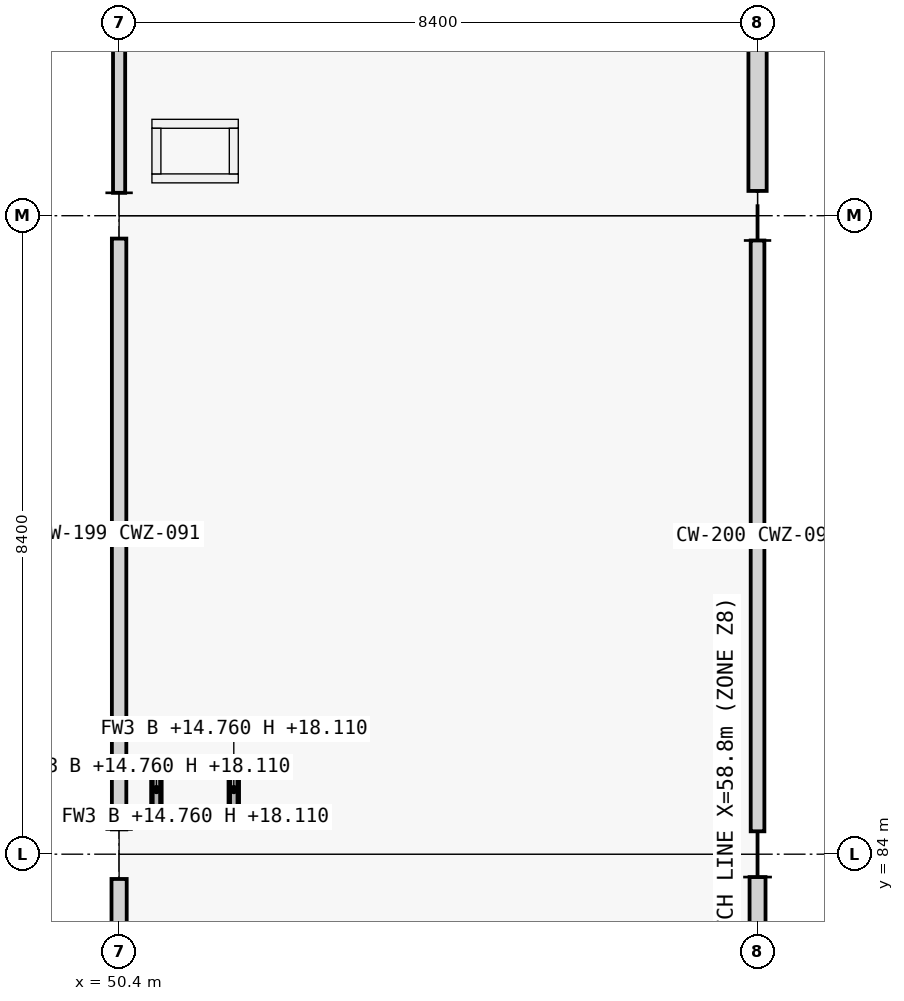
"""IFC4 building model, lengths in metres.
Left out: names, types, materials, properties, quantities, classifications, styles, units other than length and angle.
Written with IfcOpenShell. Run it as: python <this file> out.ifc"""

import sys

from ifc_helpers import new_model, si_unit, direction, frame, frame_2d, origin, origin_2d, place, context, subcontext, project, spatial, rectangle, extrude, element, save


model = new_model("IFC4")
c1 = context("Model", 3, precision=1e-05, world=origin(), true_north=direction((0.0, 1.0)))
c2 = subcontext(c1, "Body", "Model", "MODEL_VIEW")
j1 = project(units=[si_unit("LENGTHUNIT", "METRE"), si_unit("PLANEANGLEUNIT", "RADIAN")], contexts=[c1])
p1 = place(None, origin())
s1 = spatial("IfcSite", under=j1, at=p1, CompositionType="ELEMENT")
p2 = place(p1, origin())
s2 = spatial("IfcBuilding", under=s1, at=p2, CompositionType="ELEMENT")
p3 = place(p2, frame((0.0, 0.0, 14.76)))
s3 = spatial("IfcBuildingStorey", under=s2, at=p3, CompositionType="ELEMENT", Elevation=14.76)
p4 = place(p3, frame((50.4, 84.0, 0.0), z_axis=(0.0, 0.0, 1.0), x_axis=(1.0, 0.0, 0.0)))
e1 = element("IfcColumn", 1, at=p4, inside=s3, PredefinedType="COLUMN", context=c2, shape_type="SweptSolid", body=[
    extrude(rectangle(XDim=0.65, YDim=0.65, at=origin_2d()), origin(), (0.0, 0.0, 1.0), 4.32),
])
for number, where, z_axis, x_axis in (
    (2, (50.4, 92.4, 0.0), (0.0, 0.0, 1.0), (1.0, 0.0, 0.0)),
    (3, (58.8, 84.0, 0.0), (0.0, 0.0, 1.0), (1.0, 0.0, 0.0)),
):
    element("IfcColumn", number, at=place(p3, frame(where, z_axis=z_axis, x_axis=x_axis)), inside=s3, PredefinedType="COLUMN", context=c2, shape_type="SweptSolid", body=[
        extrude(rectangle(XDim=0.6, YDim=0.6, at=origin_2d()), origin(), (0.0, 0.0, 1.0), 4.32),
    ])
p5 = place(p3, frame((58.8, 92.4, 0.0), z_axis=(0.0, 0.0, 1.0), x_axis=(1.0, 0.0, 0.0)))
e4 = element("IfcColumn", 4, at=p5, inside=s3, PredefinedType="COLUMN", context=c2, shape_type="SweptSolid", body=[
    extrude(rectangle(XDim=0.65, YDim=0.65, at=origin_2d()), origin(), (0.0, 0.0, 1.0), 4.32),
])
for number, where, z_axis, x_axis in (
    (5, (50.832, 84.491, 0.0), (0.0, 0.0, 1.0), (1.0, 0.0, 0.0)),
    (6, (50.832, 85.209, 0.0), (0.0, 0.0, 1.0), (1.0, 0.0, 0.0)),
):
    element("IfcWall", number, at=place(p3, frame(where, z_axis=z_axis, x_axis=x_axis)), inside=s3, PredefinedType="PARTITIONING", context=c2, shape_type="SweptSolid", body=[
        extrude(rectangle(XDim=1.136, YDim=0.118, at=frame_2d((0.568, 0.0))), origin(), (0.0, 0.0, 1.0), 3.35),
    ])
for number, where, z_axis, x_axis in (
    (7, (50.891, 84.55, 0.0), (0.0, 0.0, 1.0), (0.0, 1.0, 0.0)),
    (8, (51.909, 84.55, 0.0), (0.0, 0.0, 1.0), (0.0, 1.0, 0.0)),
):
    element("IfcWall", number, at=place(p3, frame(where, z_axis=z_axis, x_axis=x_axis)), inside=s3, PredefinedType="PARTITIONING", context=c2, shape_type="SweptSolid", body=[
        extrude(rectangle(XDim=0.6, YDim=0.118, at=frame_2d((0.3, 0.0))), origin(), (0.0, 0.0, 1.0), 3.35),
    ])
for number, where, z_axis, x_axis in (
    (9, (50.832, 92.891, 0.0), (0.0, 0.0, 1.0), (1.0, 0.0, 0.0)),
    (10, (50.832, 93.609, 0.0), (0.0, 0.0, 1.0), (1.0, 0.0, 0.0)),
):
    element("IfcWall", number, at=place(p3, frame(where, z_axis=z_axis, x_axis=x_axis)), inside=s3, PredefinedType="PARTITIONING", context=c2, shape_type="SweptSolid", body=[
        extrude(rectangle(XDim=1.136, YDim=0.118, at=frame_2d((0.568, 0.0))), origin(), (0.0, 0.0, 1.0), 3.35),
    ])
for number, where, z_axis, x_axis in (
    (11, (50.891, 92.95, 0.0), (0.0, 0.0, 1.0), (0.0, 1.0, 0.0)),
    (12, (51.909, 92.95, 0.0), (0.0, 0.0, 1.0), (0.0, 1.0, 0.0)),
):
    element("IfcWall", number, at=place(p3, frame(where, z_axis=z_axis, x_axis=x_axis)), inside=s3, PredefinedType="PARTITIONING", context=c2, shape_type="SweptSolid", body=[
        extrude(rectangle(XDim=0.6, YDim=0.118, at=frame_2d((0.3, 0.0))), origin(), (0.0, 0.0, 1.0), 3.35),
    ])
save(model, sys.argv[1])
